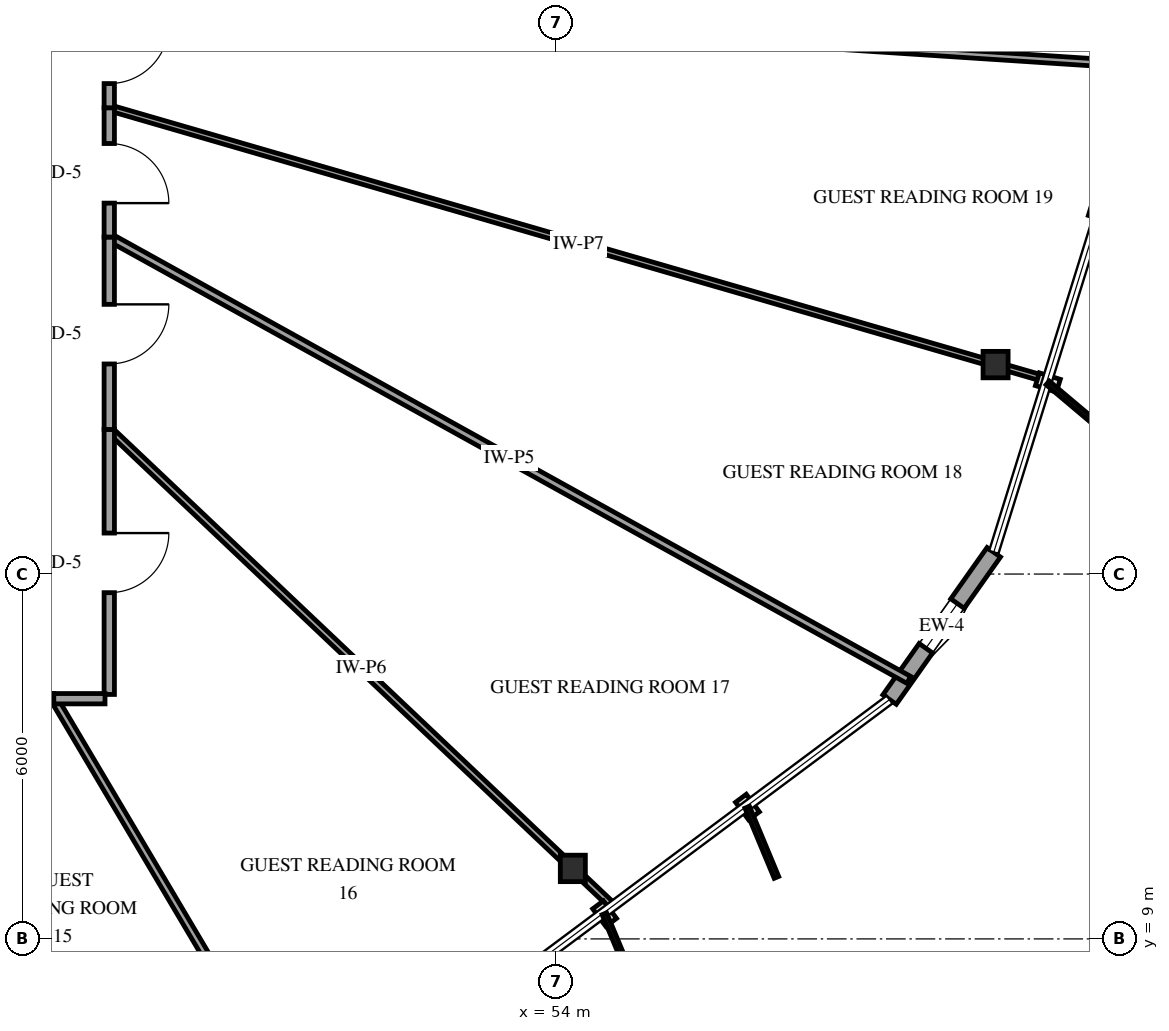
"""IFC4 building model, lengths in metres.
Left out: names, types, materials, properties, quantities, classifications, styles, units other than length and angle.
Written with IfcOpenShell. Run it as: python <this file> out.ifc"""

import sys

from ifc_helpers import new_model, si_unit, direction, frame, frame_2d, origin, origin_2d, place, context, subcontext, project, spatial, rectangle, i_section, extrude, element, fill, save


model = new_model("IFC4")
c1 = context("Model", 3, precision=1e-05, world=origin(), true_north=direction((0.0, 1.0)))
c2 = subcontext(c1, "Body", "Model", "MODEL_VIEW")
j1 = project(units=[si_unit("LENGTHUNIT", "METRE"), si_unit("PLANEANGLEUNIT", "RADIAN")], contexts=[c1])
p1 = place(None, origin())
s1 = spatial("IfcSite", under=j1, at=p1, CompositionType="ELEMENT")
p2 = place(p1, origin())
s2 = spatial("IfcBuilding", under=s1, at=p2, CompositionType="ELEMENT")
p3 = place(p2, frame((0.0, 0.0, 167.8)))
s3 = spatial("IfcBuildingStorey", under=s2, at=p3, CompositionType="ELEMENT", Elevation=167.8)
for number, where, z_axis, x_axis in (
    (1, (54.274, 10.159, 0.0), (0.0, 0.0, 1.0), (1.0, 0.0, 0.0)),
    (2, (61.226, 18.444, 0.0), (0.0, 0.0, 1.0), (1.0, 0.0, 0.0)),
):
    element("IfcColumn", number, at=place(p3, frame(where, z_axis=z_axis, x_axis=x_axis)), inside=s3, PredefinedType="COLUMN", context=c2, shape_type="SweptSolid", body=[
        extrude(i_section(OverallWidth=0.412, OverallDepth=0.435, WebThickness=0.036, FlangeThickness=0.057, FilletRadius=0.038, at=origin_2d()), origin(), (0.0, 0.0, 1.0), 3.6),
    ])
p4 = place(p3, frame((59.483, 12.936, 0.0), z_axis=(0.0, 0.0, 1.0), x_axis=(0.577542313639, 0.816360751112, 0.0)))
e3 = element("IfcWall", 3, at=p4, inside=s3, PredefinedType="SOLIDWALL", context=c2, shape_type="SweptSolid", body=[
    extrude(rectangle(XDim=2.967, YDim=0.27, at=frame_2d((1.483, 0.0))), origin(), (0.0, 0.0, 1.0), 2.679),
])
p5 = place(p4, frame((1.033, 0.0, 0.75)))
e4 = element("IfcOpeningElement", 4, at=p5, cuts=e3, PredefinedType="OPENING", context=c2, shape_type="SweptSolid", body=[
    extrude(rectangle(XDim=0.9, YDim=1.5, at=frame_2d((0.45, 0.75))), frame((0.0, 0.145, 0.0), z_axis=(0.0, -1.0, 0.0), x_axis=(1.0, 0.0, 0.0)), (0.0, 0.0, 1.0), 0.29),
])
p6 = place(p3, frame((63.685, 23.36, 0.0), z_axis=(0.0, 0.0, 1.0), x_axis=(-0.997868582242, 0.065255594198, 0.0)))
e5 = element("IfcWall", 5, at=p6, inside=s3, PredefinedType="PARTITIONING", context=c2, shape_type="SweptSolid", body=[
    extrude(rectangle(XDim=17.072, YDim=0.12, at=frame_2d((8.536, 0.0))), origin(), (0.0, 0.0, 1.0), 3.3),
])
p7 = place(p3, frame((46.65, 22.668, 0.0), z_axis=(0.0, 0.0, 1.0), x_axis=(0.960487742443, -0.278322289113, 0.0)))
e6 = element("IfcWall", 6, at=p7, inside=s3, PredefinedType="PARTITIONING", context=c2, shape_type="SweptSolid", body=[
    extrude(rectangle(XDim=16.064, YDim=0.1, at=frame_2d((8.032, 0.0))), origin(), (0.0, 0.0, 1.0), 3.3),
])
p8 = place(p3, frame((46.65, 20.542, 0.0), z_axis=(0.0, 0.0, 1.0), x_axis=(0.87479400399, -0.484495047016, 0.0)))
e7 = element("IfcWall", 7, at=p8, inside=s3, PredefinedType="PARTITIONING", context=c2, shape_type="SweptSolid", body=[
    extrude(rectangle(XDim=15.03, YDim=0.13, at=frame_2d((7.515, 0.0))), origin(), (0.0, 0.0, 1.0), 3.3),
])
p9 = place(p3, frame((46.65, 17.378, 0.0), z_axis=(0.0, 0.0, 1.0), x_axis=(0.726147344165, -0.687539114932, 0.0)))
e8 = element("IfcWall", 8, at=p9, inside=s3, PredefinedType="PARTITIONING", context=c2, shape_type="SweptSolid", body=[
    extrude(rectangle(XDim=11.401, YDim=0.11, at=frame_2d((5.701, 0.0))), origin(), (0.0, 0.0, 1.0), 2.595),
])
p10 = place(p3, frame((45.738, 12.95, 0.0), z_axis=(0.0, 0.0, 1.0), x_axis=(0.50971914419, -0.860340859222, 0.0)))
e9 = element("IfcWall", 9, at=p10, inside=s3, PredefinedType="PARTITIONING", context=c2, shape_type="SweptSolid", body=[
    extrude(rectangle(XDim=7.235, YDim=0.12, at=frame_2d((3.618, 0.0))), origin(), (0.0, 0.0, 1.0), 2.678),
])
p11 = place(p3, frame((46.65, 17.378, 0.0), z_axis=(0.0, 0.0, 1.0), x_axis=(0.0, -1.0, 0.0)))
e10 = element("IfcWall", 10, at=p11, inside=s3, PredefinedType="PARTITIONING", context=c2, shape_type="SweptSolid", body=[
    extrude(rectangle(XDim=4.358, YDim=0.17, at=frame_2d((2.179, 0.0))), origin(), (0.0, 0.0, 1.0), 3.3),
])
p12 = place(p11, frame((1.704, 0.0, 0.0)))
e11 = element("IfcOpeningElement", 11, at=p12, cuts=e10, PredefinedType="OPENING", context=c2, shape_type="SweptSolid", body=[
    extrude(rectangle(XDim=0.98, YDim=2.15, at=frame_2d((0.49, 1.075))), frame((0.0, 0.095, 0.0), z_axis=(0.0, -1.0, 0.0), x_axis=(1.0, 0.0, 0.0)), (0.0, 0.0, 1.0), 0.19),
])
p13 = place(p3, frame((46.65, 20.542, 0.0), z_axis=(0.0, 0.0, 1.0), x_axis=(0.0, -1.0, 0.0)))
e12 = element("IfcWall", 12, at=p13, inside=s3, PredefinedType="PARTITIONING", context=c2, shape_type="SweptSolid", body=[
    extrude(rectangle(XDim=3.164, YDim=0.17, at=frame_2d((1.582, 0.0))), origin(), (0.0, 0.0, 1.0), 3.3),
])
p14 = place(p13, frame((1.107, 0.0, 0.0)))
e13 = element("IfcOpeningElement", 13, at=p14, cuts=e12, PredefinedType="OPENING", context=c2, shape_type="SweptSolid", body=[
    extrude(rectangle(XDim=0.98, YDim=2.15, at=frame_2d((0.49, 1.075))), frame((0.0, 0.095, 0.0), z_axis=(0.0, -1.0, 0.0), x_axis=(1.0, 0.0, 0.0)), (0.0, 0.0, 1.0), 0.19),
])
p15 = place(p3, frame((45.738, 12.95, 0.0), z_axis=(0.0, 0.0, 1.0), x_axis=(-1.0, 0.0, 0.0)))
e14 = element("IfcWall", 14, at=p15, inside=s3, PredefinedType="PARTITIONING", context=c2, shape_type="SweptSolid", body=[
    extrude(rectangle(XDim=2.468, YDim=0.17, at=frame_2d((1.234, 0.0))), origin(), (0.0, 0.0, 1.0), 3.3),
])
p16 = place(p3, frame((46.65, 22.668, 0.0), z_axis=(0.0, 0.0, 1.0), x_axis=(0.0, -1.0, 0.0)))
e15 = element("IfcWall", 15, at=p16, inside=s3, PredefinedType="PARTITIONING", context=c2, shape_type="SweptSolid", body=[
    extrude(rectangle(XDim=2.126, YDim=0.17, at=frame_2d((1.063, 0.0))), origin(), (0.0, 0.0, 1.0), 3.3),
])
p17 = place(p16, frame((0.588, 0.0, 0.0)))
e16 = element("IfcOpeningElement", 16, at=p17, cuts=e15, PredefinedType="OPENING", context=c2, shape_type="SweptSolid", body=[
    extrude(rectangle(XDim=0.98, YDim=2.15, at=frame_2d((0.49, 1.075))), frame((0.0, 0.095, 0.0), z_axis=(0.0, -1.0, 0.0), x_axis=(1.0, 0.0, 0.0)), (0.0, 0.0, 1.0), 0.19),
])
p18 = place(p3, frame((46.65, 24.474, 0.0), z_axis=(0.0, 0.0, 1.0), x_axis=(0.0, -1.0, 0.0)))
e17 = element("IfcWall", 17, at=p18, inside=s3, PredefinedType="PARTITIONING", context=c2, shape_type="SweptSolid", body=[
    extrude(rectangle(XDim=1.806, YDim=0.17, at=frame_2d((0.903, 0.0))), origin(), (0.0, 0.0, 1.0), 3.3),
])
p19 = place(p18, frame((0.428, 0.0, 0.0)))
e18 = element("IfcOpeningElement", 18, at=p19, cuts=e17, PredefinedType="OPENING", context=c2, shape_type="SweptSolid", body=[
    extrude(rectangle(XDim=0.98, YDim=2.15, at=frame_2d((0.49, 1.075))), frame((0.0, 0.095, 0.0), z_axis=(0.0, -1.0, 0.0), x_axis=(1.0, 0.0, 0.0)), (0.0, 0.0, 1.0), 0.19),
])
p20 = place(p3, frame((46.58, 12.95, 0.0), z_axis=(0.0, 0.0, 1.0), x_axis=(-1.0, 0.0, 0.0)))
e19 = element("IfcWall", 19, at=p20, inside=s3, PredefinedType="PARTITIONING", context=c2, shape_type="SweptSolid", body=[
    extrude(rectangle(XDim=0.842, YDim=0.17, at=frame_2d((0.421, 0.0))), origin(), (0.0, 0.0, 1.0), 3.3),
])
p21 = place(p5, origin())
e20 = element("IfcWindow", 20, at=p21, inside=s3, PartitioningType="SINGLE_PANEL", PredefinedType="WINDOW", context=c2, shape_type="SweptSolid", body=[
    extrude(rectangle(XDim=0.9, YDim=1.5, at=frame_2d((0.45, 0.75))), frame((0.0, 0.03, 0.0), z_axis=(0.0, -1.0, 0.0), x_axis=(1.0, 0.0, 0.0)), (0.0, 0.0, 1.0), 0.06),
])
fill(e4, e20)
p22 = place(p12, origin())
e21 = element("IfcDoor", 21, at=p22, inside=s3, OperationType="SINGLE_SWING_LEFT", PredefinedType="DOOR", context=c2, shape_type="SweptSolid", body=[
    extrude(rectangle(XDim=0.98, YDim=2.15, at=frame_2d((0.49, 1.075))), frame((0.0, 0.025, 0.0), z_axis=(0.0, -1.0, 0.0), x_axis=(1.0, 0.0, 0.0)), (0.0, 0.0, 1.0), 0.05),
])
fill(e11, e21)
p23 = place(p14, origin())
e22 = element("IfcDoor", 22, at=p23, inside=s3, OperationType="SINGLE_SWING_LEFT", PredefinedType="DOOR", context=c2, shape_type="SweptSolid", body=[
    extrude(rectangle(XDim=0.98, YDim=2.15, at=frame_2d((0.49, 1.075))), frame((0.0, 0.025, 0.0), z_axis=(0.0, -1.0, 0.0), x_axis=(1.0, 0.0, 0.0)), (0.0, 0.0, 1.0), 0.05),
])
fill(e13, e22)
p24 = place(p17, origin())
e23 = element("IfcDoor", 23, at=p24, inside=s3, OperationType="SINGLE_SWING_RIGHT", PredefinedType="DOOR", context=c2, shape_type="SweptSolid", body=[
    extrude(rectangle(XDim=0.98, YDim=2.15, at=frame_2d((0.49, 1.075))), frame((0.0, 0.025, 0.0), z_axis=(0.0, -1.0, 0.0), x_axis=(1.0, 0.0, 0.0)), (0.0, 0.0, 1.0), 0.05),
])
fill(e16, e23)
p25 = place(p19, origin())
e24 = element("IfcDoor", 24, at=p25, inside=s3, OperationType="SINGLE_SWING_LEFT", PredefinedType="DOOR", context=c2, shape_type="SweptSolid", body=[
    extrude(rectangle(XDim=0.98, YDim=2.15, at=frame_2d((0.49, 1.075))), frame((0.0, 0.025, 0.0), z_axis=(0.0, -1.0, 0.0), x_axis=(1.0, 0.0, 0.0)), (0.0, 0.0, 1.0), 0.05),
])
fill(e18, e24)
save(model, sys.argv[1])
